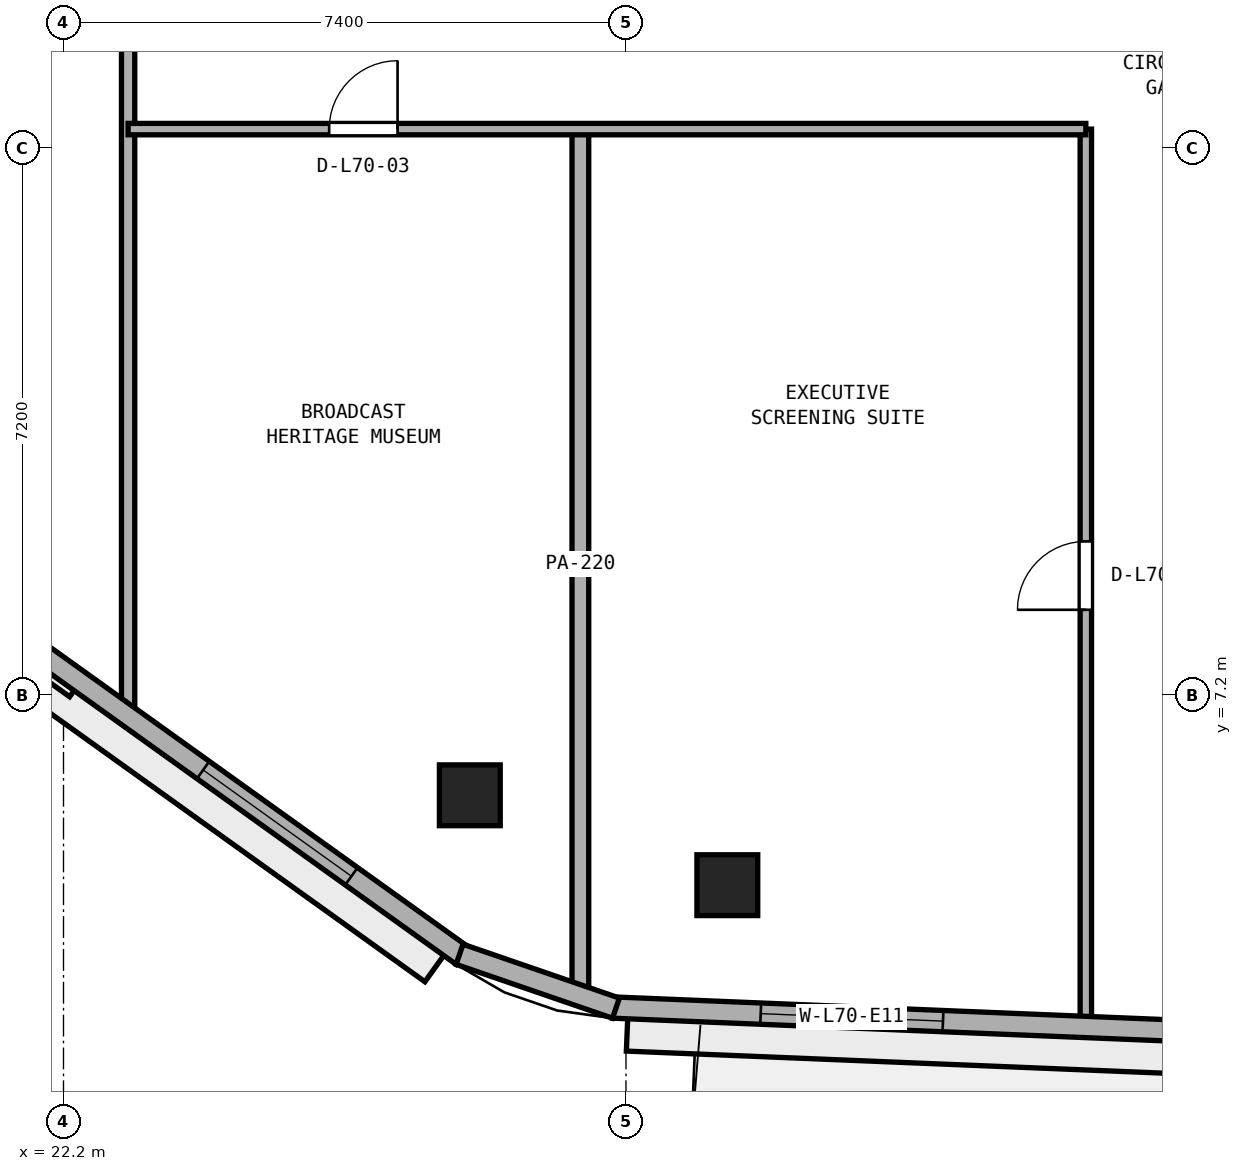
"""IFC4 building model, lengths in metres.
Left out: names, types, materials, properties, quantities, classifications, styles, units other than length and angle.
Written with IfcOpenShell. Run it as: python <this file> out.ifc"""

import sys

from ifc_helpers import new_model, si_unit, direction, frame, frame_2d, origin, origin_2d, place, context, subcontext, project, spatial, rectangle, extrude, element, fill, save


model = new_model("IFC4")
c1 = context("Model", 3, precision=1e-05, world=origin(), true_north=direction((0.0, 1.0)))
c2 = subcontext(c1, "Body", "Model", "MODEL_VIEW")
j1 = project(units=[si_unit("LENGTHUNIT", "METRE"), si_unit("PLANEANGLEUNIT", "RADIAN")], contexts=[c1])
p1 = place(None, origin())
s1 = spatial("IfcSite", under=j1, at=p1, CompositionType="ELEMENT")
p2 = place(p1, origin())
s2 = spatial("IfcBuilding", under=s1, at=p2, CompositionType="ELEMENT")
p3 = place(p2, frame((0.0, 0.0, 274.4)))
s3 = spatial("IfcBuildingStorey", under=s2, at=p3, CompositionType="ELEMENT", Elevation=274.4)
for number, where, z_axis, x_axis in (
    (1, (30.934, 4.703, 0.0), (0.0, 0.0, 1.0), (1.0, 0.0, 0.0)),
    (2, (27.545, 5.886, 0.0), (0.0, 0.0, 1.0), (1.0, 0.0, 0.0)),
):
    element("IfcColumn", number, at=place(p3, frame(where, z_axis=z_axis, x_axis=x_axis)), inside=s3, PredefinedType="COLUMN", context=c2, shape_type="SweptSolid", body=[
        extrude(rectangle(XDim=0.8, YDim=0.8, at=origin_2d()), origin(), (0.0, 0.0, 1.0), 3.8),
    ])
p4 = place(p3, frame((35.65, 2.902, 0.0), z_axis=(0.0, 0.0, 1.0), x_axis=(0.0, 1.0, 0.0)))
e3 = element("IfcWall", 3, at=p4, inside=s3, PredefinedType="PARTITIONING", context=c2, shape_type="SweptSolid", body=[
    extrude(rectangle(XDim=11.748, YDim=0.15, at=frame_2d((5.874, 0.0))), origin(), (0.0, 0.0, 1.0), 3.54),
])
p5 = place(p4, frame((5.424, 0.0, 0.0)))
e4 = element("IfcOpeningElement", 4, at=p5, cuts=e3, PredefinedType="OPENING", context=c2, shape_type="SweptSolid", body=[
    extrude(rectangle(XDim=0.9, YDim=2.1, at=frame_2d((0.45, 1.05))), frame((0.0, 0.085, 0.0), z_axis=(0.0, -1.0, 0.0), x_axis=(1.0, 0.0, 0.0)), (0.0, 0.0, 1.0), 0.17),
])
p6 = place(p3, frame((29.0, 3.217, 0.0), z_axis=(0.0, 0.0, 1.0), x_axis=(0.0, 1.0, 0.0)))
e5 = element("IfcWall", 5, at=p6, inside=s3, PredefinedType="PARTITIONING", context=c2, shape_type="SweptSolid", body=[
    extrude(rectangle(XDim=11.433, YDim=0.22, at=frame_2d((5.716, 0.0))), origin(), (0.0, 0.0, 1.0), 3.54),
])
p7 = place(p3, frame((23.05, 6.894, 0.0), z_axis=(0.0, 0.0, 1.0), x_axis=(0.0, 1.0, 0.0)))
e6 = element("IfcWall", 6, at=p7, inside=s3, PredefinedType="PARTITIONING", context=c2, shape_type="SweptSolid", body=[
    extrude(rectangle(XDim=36.312, YDim=0.175, at=frame_2d((18.156, 0.0))), origin(), (0.0, 0.0, 1.0), 3.54),
])
p8 = place(p7, frame((9.031, 0.0, 0.0)))
e7 = element("IfcOpeningElement", 7, at=p8, cuts=e6, PredefinedType="OPENING", context=c2, shape_type="SweptSolid", body=[
    extrude(rectangle(XDim=0.9, YDim=2.1, at=frame_2d((0.45, 1.05))), frame((0.0, 0.097, 0.0), z_axis=(0.0, -1.0, 0.0), x_axis=(1.0, 0.0, 0.0)), (0.0, 0.0, 1.0), 0.195),
])
p9 = place(p7, frame((14.056, 0.0, 0.0)))
e8 = element("IfcOpeningElement", 8, at=p9, cuts=e6, PredefinedType="OPENING", context=c2, shape_type="SweptSolid", body=[
    extrude(rectangle(XDim=0.9, YDim=2.1, at=frame_2d((0.45, 1.05))), frame((0.0, 0.097, 0.0), z_axis=(0.0, -1.0, 0.0), x_axis=(1.0, 0.0, 0.0)), (0.0, 0.0, 1.0), 0.195),
])
p10 = place(p7, frame((20.606, 0.0, 0.0)))
e9 = element("IfcOpeningElement", 9, at=p10, cuts=e6, PredefinedType="OPENING", context=c2, shape_type="SweptSolid", body=[
    extrude(rectangle(XDim=1.0, YDim=2.12, at=frame_2d((0.5, 1.06))), frame((0.0, 0.097, 0.0), z_axis=(0.0, -1.0, 0.0), x_axis=(1.0, 0.0, 0.0)), (0.0, 0.0, 1.0), 0.195),
])
p11 = place(p7, frame((26.181, 0.0, 0.0)))
e10 = element("IfcOpeningElement", 10, at=p11, cuts=e6, PredefinedType="OPENING", context=c2, shape_type="SweptSolid", body=[
    extrude(rectangle(XDim=0.9, YDim=2.1, at=frame_2d((0.45, 1.05))), frame((0.0, 0.097, 0.0), z_axis=(0.0, -1.0, 0.0), x_axis=(1.0, 0.0, 0.0)), (0.0, 0.0, 1.0), 0.195),
])
p12 = place(p3, frame((23.05, 14.65, 0.0), z_axis=(0.0, 0.0, 1.0), x_axis=(1.0, 0.0, 0.0)))
e11 = element("IfcWall", 11, at=p12, inside=s3, PredefinedType="PARTITIONING", context=c2, shape_type="SweptSolid", body=[
    extrude(rectangle(XDim=12.6, YDim=0.15, at=frame_2d((6.3, 0.0))), origin(), (0.0, 0.0, 1.0), 3.54),
])
p13 = place(p12, frame((2.645, 0.0, 0.0)))
e12 = element("IfcOpeningElement", 12, at=p13, cuts=e11, PredefinedType="OPENING", context=c2, shape_type="SweptSolid", body=[
    extrude(rectangle(XDim=0.9, YDim=2.1, at=frame_2d((0.45, 1.05))), frame((0.0, 0.085, 0.0), z_axis=(0.0, -1.0, 0.0), x_axis=(1.0, 0.0, 0.0)), (0.0, 0.0, 1.0), 0.17),
])
p14 = place(p3, frame((29.428, 3.093, 0.0), z_axis=(0.0, 0.0, 1.0), x_axis=(0.999156257967, -0.041070331944, 0.0)))
e13 = element("IfcWall", 13, at=p14, inside=s3, PredefinedType="STANDARD", context=c2, shape_type="SweptSolid", body=[
    extrude(rectangle(XDim=16.876, YDim=0.28, at=frame_2d((8.438, 0.0))), origin(), (0.0, 0.0, 1.0), 3.54),
])
p15 = place(p14, frame((7.588, 0.0, 0.0)))
e14 = element("IfcOpeningElement", 14, at=p15, cuts=e13, PredefinedType="OPENING", context=c2, shape_type="SweptSolid", body=[
    extrude(rectangle(XDim=1.1, YDim=2.2, at=frame_2d((0.55, 1.1))), frame((0.0, 0.15, 0.0), z_axis=(0.0, -1.0, 0.0), x_axis=(1.0, 0.0, 0.0)), (0.0, 0.0, 1.0), 0.3),
])
p16 = place(p14, frame((1.946, 0.0, 0.9)))
e15 = element("IfcOpeningElement", 15, at=p16, cuts=e13, PredefinedType="OPENING", context=c2, shape_type="SweptSolid", body=[
    extrude(rectangle(XDim=2.4, YDim=1.75, at=frame_2d((1.2, 0.875))), frame((0.0, 0.15, 0.0), z_axis=(0.0, -1.0, 0.0), x_axis=(1.0, 0.0, 0.0)), (0.0, 0.0, 1.0), 0.3),
])
p17 = place(p14, frame((12.53, 0.0, 0.9)))
e16 = element("IfcOpeningElement", 16, at=p17, cuts=e13, PredefinedType="OPENING", context=c2, shape_type="SweptSolid", body=[
    extrude(rectangle(XDim=2.4, YDim=1.75, at=frame_2d((1.2, 0.875))), frame((0.0, 0.15, 0.0), z_axis=(0.0, -1.0, 0.0), x_axis=(1.0, 0.0, 0.0)), (0.0, 0.0, 1.0), 0.3),
])
p18 = place(p3, frame((14.468, 13.077, 0.0), z_axis=(0.0, 0.0, 1.0), x_axis=(0.812809888039, -0.582529042972, 0.0)))
e17 = element("IfcWall", 17, at=p18, inside=s3, PredefinedType="STANDARD", context=c2, shape_type="SweptSolid", body=[
    extrude(rectangle(XDim=15.968, YDim=0.28, at=frame_2d((7.984, 0.0))), origin(), (0.0, 0.0, 1.0), 3.54),
])
p19 = place(p18, frame((1.795, 0.0, 0.9)))
e18 = element("IfcOpeningElement", 18, at=p19, cuts=e17, PredefinedType="OPENING", context=c2, shape_type="SweptSolid", body=[
    extrude(rectangle(XDim=2.4, YDim=1.75, at=frame_2d((1.2, 0.875))), frame((0.0, 0.15, 0.0), z_axis=(0.0, -1.0, 0.0), x_axis=(1.0, 0.0, 0.0)), (0.0, 0.0, 1.0), 0.3),
])
p20 = place(p18, frame((6.784, 0.0, 0.9)))
e19 = element("IfcOpeningElement", 19, at=p20, cuts=e17, PredefinedType="OPENING", context=c2, shape_type="SweptSolid", body=[
    extrude(rectangle(XDim=2.4, YDim=1.75, at=frame_2d((1.2, 0.875))), frame((0.0, 0.15, 0.0), z_axis=(0.0, -1.0, 0.0), x_axis=(1.0, 0.0, 0.0)), (0.0, 0.0, 1.0), 0.3),
])
p21 = place(p18, frame((11.773, 0.0, 0.9)))
e20 = element("IfcOpeningElement", 20, at=p21, cuts=e17, PredefinedType="OPENING", context=c2, shape_type="SweptSolid", body=[
    extrude(rectangle(XDim=2.4, YDim=1.75, at=frame_2d((1.2, 0.875))), frame((0.0, 0.15, 0.0), z_axis=(0.0, -1.0, 0.0), x_axis=(1.0, 0.0, 0.0)), (0.0, 0.0, 1.0), 0.3),
])
p22 = place(p3, frame((27.411, 3.794, 0.0), z_axis=(0.0, 0.0, 1.0), x_axis=(0.945552869008, -0.325468542121, 0.0)))
e21 = element("IfcWall", 21, at=p22, inside=s3, PredefinedType="STANDARD", context=c2, shape_type="SweptSolid", body=[
    extrude(rectangle(XDim=2.176, YDim=0.28, at=frame_2d((1.088, 0.0))), origin(), (0.0, 0.0, 1.0), 3.54),
])
p23 = place(p13, origin())
e22 = element("IfcDoor", 22, at=p23, inside=s3, OperationType="SINGLE_SWING_RIGHT", PredefinedType="DOOR", context=c2, shape_type="SweptSolid", body=[
    extrude(rectangle(XDim=0.9, YDim=2.1, at=frame_2d((0.45, 1.05))), frame((0.0, 0.025, 0.0), z_axis=(0.0, -1.0, 0.0), x_axis=(1.0, 0.0, 0.0)), (0.0, 0.0, 1.0), 0.05),
])
fill(e12, e22)
p24 = place(p5, origin())
e23 = element("IfcDoor", 23, at=p24, inside=s3, OperationType="SINGLE_SWING_LEFT", PredefinedType="DOOR", context=c2, shape_type="SweptSolid", body=[
    extrude(rectangle(XDim=0.9, YDim=2.1, at=frame_2d((0.45, 1.05))), frame((0.0, 0.025, 0.0), z_axis=(0.0, -1.0, 0.0), x_axis=(1.0, 0.0, 0.0)), (0.0, 0.0, 1.0), 0.05),
])
fill(e4, e23)
p25 = place(p16, origin())
e24 = element("IfcWindow", 24, at=p25, inside=s3, PartitioningType="SINGLE_PANEL", PredefinedType="WINDOW", context=c2, shape_type="SweptSolid", body=[
    extrude(rectangle(XDim=2.4, YDim=1.75, at=frame_2d((1.2, 0.875))), frame((0.0, 0.03, 0.0), z_axis=(0.0, -1.0, 0.0), x_axis=(1.0, 0.0, 0.0)), (0.0, 0.0, 1.0), 0.06),
])
fill(e15, e24)
p26 = place(p21, origin())
e25 = element("IfcWindow", 25, at=p26, inside=s3, PartitioningType="SINGLE_PANEL", PredefinedType="WINDOW", context=c2, shape_type="SweptSolid", body=[
    extrude(rectangle(XDim=2.4, YDim=1.75, at=frame_2d((1.2, 0.875))), frame((0.0, 0.03, 0.0), z_axis=(0.0, -1.0, 0.0), x_axis=(1.0, 0.0, 0.0)), (0.0, 0.0, 1.0), 0.06),
])
fill(e20, e25)
save(model, sys.argv[1])
